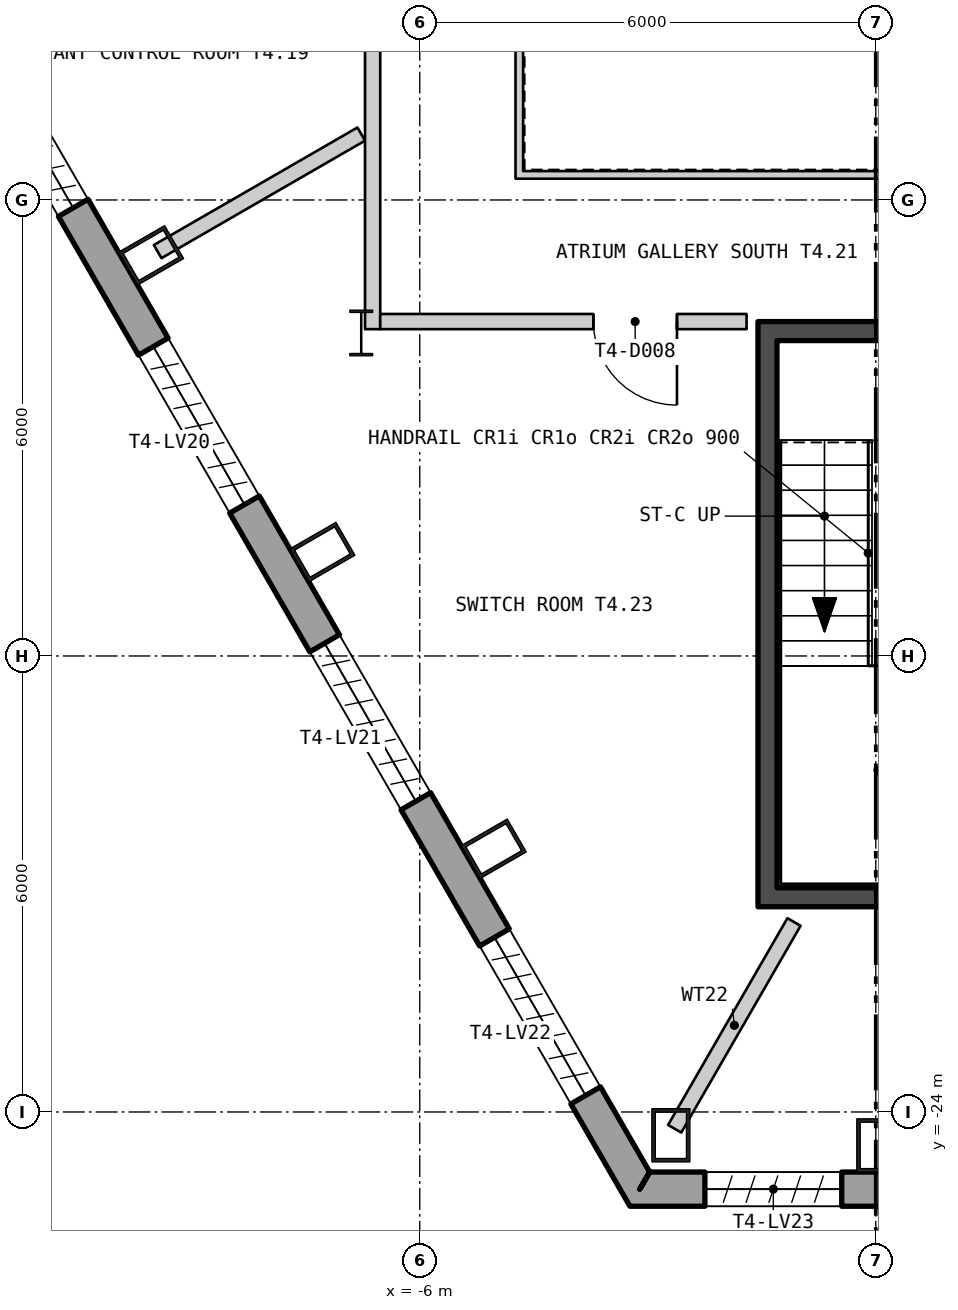
"""IFC4 building model, lengths in metres.
Left out: names, types, materials, properties, quantities, classifications, styles, units other than length and angle.
Written with IfcOpenShell. Run it as: python <this file> out.ifc"""

import sys

from ifc_helpers import new_model, si_unit, direction, frame, frame_2d, origin, origin_2d, place, context, subcontext, project, spatial, polyline, rectangle, hollow_rectangle, i_section, outline, extrude, element, fill, save


model = new_model("IFC4")
c1 = context("Model", 3, precision=1e-05, world=origin(), true_north=direction((0.0, 1.0)))
c2 = subcontext(c1, "Body", "Model", "MODEL_VIEW")
j1 = project(units=[si_unit("LENGTHUNIT", "METRE"), si_unit("PLANEANGLEUNIT", "RADIAN")], contexts=[c1])
p1 = place(None, origin())
s1 = spatial("IfcSite", under=j1, at=p1, CompositionType="ELEMENT")
p2 = place(p1, origin())
s2 = spatial("IfcBuilding", under=s1, at=p2, CompositionType="ELEMENT")
p3 = place(p2, frame((0.0, 0.0, 239.4)))
s3 = spatial("IfcBuildingStorey", under=s2, at=p3, CompositionType="ELEMENT", Elevation=239.4)
for number, where, z_axis, x_axis in (
    (1, (-9.535, -12.729, 0.0), (0.0, 0.0, 1.0), (0.5, -0.866, 0.0)),
    (2, (-7.281, -16.633, 0.0), (0.0, 0.0, 1.0), (0.5, -0.866, 0.0)),
    (3, (-5.027, -20.537, 0.0), (0.0, 0.0, 1.0), (0.5, -0.866, 0.0)),
    (4, (-2.696, -24.307, 0.0), (0.0, 0.0, 1.0), (1.0, 0.0, 0.0)),
    (5, (0.0, -24.44, 0.0), (0.0, 0.0, 1.0), (1.0, 0.0, 0.0)),
):
    element("IfcColumn", number, at=place(p3, frame(where, z_axis=z_axis, x_axis=x_axis)), inside=s3, PredefinedType="COLUMN", context=c2, shape_type="SweptSolid", body=[
        extrude(hollow_rectangle(XDim=0.5, YDim=0.7, WallThickness=0.045, at=origin_2d()), origin(), (0.0, 0.0, 1.0), 6.0),
    ])
p4 = place(p3, frame((-6.77, -13.75, 0.0), z_axis=(0.0, 0.0, 1.0), x_axis=(1.0, 0.0, 0.0)))
e6 = element("IfcColumn", 6, at=p4, inside=s3, PredefinedType="COLUMN", context=c2, shape_type="SweptSolid", body=[
    extrude(i_section(OverallWidth=0.3, OverallDepth=0.6, WebThickness=0.015, FlangeThickness=0.03, at=origin_2d()), origin(), (0.0, 0.0, 1.0), 6.0),
])
p5 = place(p3, frame((-25.975, 14.597, -0.18), z_axis=(0.0, 0.0, 1.0), x_axis=(0.499999764979, -0.866025539474, 0.0)))
e7 = element("IfcWall", 7, at=p5, inside=s3, PredefinedType="SOLIDWALL", context=c2, shape_type="SweptSolid", body=[
    extrude(outline(polyline([(-0.13, -0.225), (45.87, -0.225), (45.61, 0.225), (0.13, 0.225), (-0.13, -0.225)])), origin(), (0.0, 0.0, 1.0), 6.0),
])
p6 = place(p5, frame((1.424, 0.0, 1.38)))
e8 = element("IfcOpeningElement", 8, at=p6, cuts=e7, PredefinedType="OPENING", context=c2, shape_type="SweptSolid", body=[
    extrude(rectangle(XDim=2.4, YDim=3.6, at=frame_2d((1.2, 1.8))), frame((0.0, 0.235, 0.0), z_axis=(0.0, -1.0, 0.0), x_axis=(1.0, 0.0, 0.0)), (0.0, 0.0, 1.0), 0.47),
])
p7 = place(p5, frame((5.893, 0.0, 1.38)))
e9 = element("IfcOpeningElement", 9, at=p7, cuts=e7, PredefinedType="OPENING", context=c2, shape_type="SweptSolid", body=[
    extrude(rectangle(XDim=2.4, YDim=3.6, at=frame_2d((1.2, 1.8))), frame((0.0, 0.235, 0.0), z_axis=(0.0, -1.0, 0.0), x_axis=(1.0, 0.0, 0.0)), (0.0, 0.0, 1.0), 0.47),
])
p8 = place(p5, frame((10.401, 0.0, 1.38)))
e10 = element("IfcOpeningElement", 10, at=p8, cuts=e7, PredefinedType="OPENING", context=c2, shape_type="SweptSolid", body=[
    extrude(rectangle(XDim=2.4, YDim=3.6, at=frame_2d((1.2, 1.8))), frame((0.0, 0.235, 0.0), z_axis=(0.0, -1.0, 0.0), x_axis=(1.0, 0.0, 0.0)), (0.0, 0.0, 1.0), 0.47),
])
p9 = place(p5, frame((14.909, 0.0, 1.38)))
e11 = element("IfcOpeningElement", 11, at=p9, cuts=e7, PredefinedType="OPENING", context=c2, shape_type="SweptSolid", body=[
    extrude(rectangle(XDim=2.4, YDim=3.6, at=frame_2d((1.2, 1.8))), frame((0.0, 0.235, 0.0), z_axis=(0.0, -1.0, 0.0), x_axis=(1.0, 0.0, 0.0)), (0.0, 0.0, 1.0), 0.47),
])
p10 = place(p5, frame((19.416, 0.0, 1.38)))
e12 = element("IfcOpeningElement", 12, at=p10, cuts=e7, PredefinedType="OPENING", context=c2, shape_type="SweptSolid", body=[
    extrude(rectangle(XDim=2.4, YDim=3.6, at=frame_2d((1.2, 1.8))), frame((0.0, 0.235, 0.0), z_axis=(0.0, -1.0, 0.0), x_axis=(1.0, 0.0, 0.0)), (0.0, 0.0, 1.0), 0.47),
])
p11 = place(p5, frame((23.924, 0.0, 1.38)))
e13 = element("IfcOpeningElement", 13, at=p11, cuts=e7, PredefinedType="OPENING", context=c2, shape_type="SweptSolid", body=[
    extrude(rectangle(XDim=2.4, YDim=3.6, at=frame_2d((1.2, 1.8))), frame((0.0, 0.235, 0.0), z_axis=(0.0, -1.0, 0.0), x_axis=(1.0, 0.0, 0.0)), (0.0, 0.0, 1.0), 0.47),
])
p12 = place(p5, frame((28.431, 0.0, 1.38)))
e14 = element("IfcOpeningElement", 14, at=p12, cuts=e7, PredefinedType="OPENING", context=c2, shape_type="SweptSolid", body=[
    extrude(rectangle(XDim=2.4, YDim=3.6, at=frame_2d((1.2, 1.8))), frame((0.0, 0.235, 0.0), z_axis=(0.0, -1.0, 0.0), x_axis=(1.0, 0.0, 0.0)), (0.0, 0.0, 1.0), 0.47),
])
p13 = place(p5, frame((32.939, 0.0, 1.38)))
e15 = element("IfcOpeningElement", 15, at=p13, cuts=e7, PredefinedType="OPENING", context=c2, shape_type="SweptSolid", body=[
    extrude(rectangle(XDim=2.4, YDim=3.6, at=frame_2d((1.2, 1.8))), frame((0.0, 0.235, 0.0), z_axis=(0.0, -1.0, 0.0), x_axis=(1.0, 0.0, 0.0)), (0.0, 0.0, 1.0), 0.47),
])
p14 = place(p5, frame((37.447, 0.0, 1.38)))
e16 = element("IfcOpeningElement", 16, at=p14, cuts=e7, PredefinedType="OPENING", context=c2, shape_type="SweptSolid", body=[
    extrude(rectangle(XDim=2.4, YDim=3.6, at=frame_2d((1.2, 1.8))), frame((0.0, 0.235, 0.0), z_axis=(0.0, -1.0, 0.0), x_axis=(1.0, 0.0, 0.0)), (0.0, 0.0, 1.0), 0.47),
])
p15 = place(p5, frame((41.916, 0.0, 1.38)))
e17 = element("IfcOpeningElement", 17, at=p15, cuts=e7, PredefinedType="OPENING", context=c2, shape_type="SweptSolid", body=[
    extrude(rectangle(XDim=2.4, YDim=3.6, at=frame_2d((1.2, 1.8))), frame((0.0, 0.235, 0.0), z_axis=(0.0, -1.0, 0.0), x_axis=(1.0, 0.0, 0.0)), (0.0, 0.0, 1.0), 0.47),
])
p16 = place(p3, frame((-3.105, -25.015, -0.18), z_axis=(0.0, 0.0, 1.0), x_axis=(1.0, 0.0, 0.0)))
e18 = element("IfcWall", 18, at=p16, inside=s3, PredefinedType="SOLIDWALL", context=c2, shape_type="SweptSolid", body=[
    extrude(outline(polyline([(-0.13, -0.225), (6.34, -0.225), (6.08, 0.225), (0.13, 0.225), (-0.13, -0.225)])), origin(), (0.0, 0.0, 1.0), 6.0),
])
p17 = place(p16, frame((0.857, 0.0, 1.38)))
e19 = element("IfcOpeningElement", 19, at=p17, cuts=e18, PredefinedType="OPENING", context=c2, shape_type="SweptSolid", body=[
    extrude(rectangle(XDim=1.8, YDim=3.6, at=frame_2d((0.9, 1.8))), frame((0.0, 0.235, 0.0), z_axis=(0.0, -1.0, 0.0), x_axis=(1.0, 0.0, 0.0)), (0.0, 0.0, 1.0), 0.47),
])
p18 = place(p16, frame((3.553, 0.0, 1.38)))
e20 = element("IfcOpeningElement", 20, at=p18, cuts=e18, PredefinedType="OPENING", context=c2, shape_type="SweptSolid", body=[
    extrude(rectangle(XDim=1.8, YDim=3.6, at=frame_2d((0.9, 1.8))), frame((0.0, 0.235, 0.0), z_axis=(0.0, -1.0, 0.0), x_axis=(1.0, 0.0, 0.0)), (0.0, 0.0, 1.0), 0.47),
])
p19 = place(p3, frame((-4.74, -11.67, 0.0), z_axis=(0.0, 0.0, 1.0), x_axis=(1.0, 0.0, 0.0)))
e21 = element("IfcWall", 21, at=p19, inside=s3, PredefinedType="PARTITIONING", context=c2, shape_type="SweptSolid", body=[
    extrude(rectangle(XDim=9.48, YDim=0.1, at=frame_2d((4.74, 0.0))), origin(), (0.0, 0.0, 1.0), 5.8),
])
p20 = place(p3, frame((-4.69, -3.58, 0.0), z_axis=(0.0, 0.0, 1.0), x_axis=(0.0, -1.0, 0.0)))
e22 = element("IfcWall", 22, at=p20, inside=s3, PredefinedType="PARTITIONING", context=c2, shape_type="SweptSolid", body=[
    extrude(rectangle(XDim=8.04, YDim=0.1, at=frame_2d((4.02, 0.0))), origin(), (0.0, 0.0, 1.0), 5.8),
])
p21 = place(p3, frame((-1.425, -21.05, 0.0), z_axis=(0.0, 0.0, 1.0), x_axis=(0.0, 1.0, 0.0)))
e23 = element("IfcWall", 23, at=p21, inside=s3, PredefinedType="SHEAR", context=c2, shape_type="SweptSolid", body=[
    extrude(rectangle(XDim=7.2, YDim=0.25, at=frame_2d((3.6, 0.0))), origin(), (0.0, 0.0, 1.0), 5.8),
])
for number, where, z_axis, x_axis in (
    (24, (-1.55, -21.175, 0.0), (0.0, 0.0, 1.0), (1.0, 0.0, 0.0)),
    (25, (-1.55, -13.725, 0.0), (0.0, 0.0, 1.0), (1.0, 0.0, 0.0)),
):
    element("IfcWall", number, at=place(p3, frame(where, z_axis=z_axis, x_axis=x_axis)), inside=s3, PredefinedType="SHEAR", context=c2, shape_type="SweptSolid", body=[
        extrude(rectangle(XDim=3.1, YDim=0.25, at=frame_2d((1.55, 0.0))), origin(), (0.0, 0.0, 1.0), 5.8),
    ])
p22 = place(p3, frame((-9.448, -12.679, 0.0), z_axis=(0.0, 0.0, 1.0), x_axis=(0.866045570776, 0.499965068118, 0.0)))
e26 = element("IfcWall", 26, at=p22, inside=s3, PredefinedType="PARTITIONING", context=c2, shape_type="SweptSolid", body=[
    extrude(rectangle(XDim=3.092, YDim=0.2, at=frame_2d((1.546, 0.0))), origin(), (0.0, 0.0, 1.0), 5.8),
])
p23 = place(p3, frame((-6.62, -13.7, 0.0), z_axis=(0.0, 0.0, 1.0), x_axis=(0.0, 1.0, 0.0)))
e27 = element("IfcWall", 27, at=p23, inside=s3, PredefinedType="PARTITIONING", context=c2, shape_type="SweptSolid", body=[
    extrude(rectangle(XDim=10.5, YDim=0.2, at=frame_2d((5.25, 0.0))), origin(), (0.0, 0.0, 1.0), 5.21),
])
p24 = place(p23, frame((4.656, 0.0, 0.0)))
e28 = element("IfcOpeningElement", 28, at=p24, cuts=e27, PredefinedType="OPENING", context=c2, shape_type="SweptSolid", body=[
    extrude(rectangle(XDim=1.1, YDim=2.1, at=frame_2d((0.55, 1.05))), frame((0.0, 0.11, 0.0), z_axis=(0.0, -1.0, 0.0), x_axis=(1.0, 0.0, 0.0)), (0.0, 0.0, 1.0), 0.22),
])
p25 = place(p23, frame((8.059, 0.0, 0.0)))
e29 = element("IfcOpeningElement", 29, at=p25, cuts=e27, PredefinedType="OPENING", context=c2, shape_type="SweptSolid", body=[
    extrude(rectangle(XDim=1.1, YDim=2.1, at=frame_2d((0.55, 1.05))), frame((0.0, 0.11, 0.0), z_axis=(0.0, -1.0, 0.0), x_axis=(1.0, 0.0, 0.0)), (0.0, 0.0, 1.0), 0.22),
])
p26 = place(p3, frame((-6.52, -13.6, 0.0), z_axis=(0.0, 0.0, 1.0), x_axis=(1.0, 0.0, 0.0)))
e30 = element("IfcWall", 30, at=p26, inside=s3, PredefinedType="PARTITIONING", context=c2, shape_type="SweptSolid", body=[
    extrude(rectangle(XDim=4.82, YDim=0.2, at=frame_2d((2.41, 0.0))), origin(), (0.0, 0.0, 1.0), 5.01),
])
p27 = place(p26, frame((2.804, 0.0, 0.0)))
e31 = element("IfcOpeningElement", 31, at=p27, cuts=e30, PredefinedType="OPENING", context=c2, shape_type="SweptSolid", body=[
    extrude(rectangle(XDim=1.1, YDim=2.1, at=frame_2d((0.55, 1.05))), frame((0.0, 0.11, 0.0), z_axis=(0.0, -1.0, 0.0), x_axis=(1.0, 0.0, 0.0)), (0.0, 0.0, 1.0), 0.22),
])
p28 = place(p3, frame((-2.646, -24.221, 0.0), z_axis=(0.0, 0.0, 1.0), x_axis=(0.499768381861, 0.866159087288, 0.0)))
e32 = element("IfcWall", 32, at=p28, inside=s3, PredefinedType="PARTITIONING", context=c2, shape_type="SweptSolid", body=[
    extrude(rectangle(XDim=3.142, YDim=0.2, at=frame_2d((1.571, 0.0))), origin(), (0.0, 0.0, 1.0), 5.8),
])
p29 = place(p27, origin())
e33 = element("IfcDoor", 33, at=p29, inside=s3, OperationType="SINGLE_SWING_RIGHT", PredefinedType="DOOR", context=c2, shape_type="SweptSolid", body=[
    extrude(rectangle(XDim=1.1, YDim=2.1, at=frame_2d((0.55, 1.05))), frame((0.0, 0.025, 0.0), z_axis=(0.0, -1.0, 0.0), x_axis=(1.0, 0.0, 0.0)), (0.0, 0.0, 1.0), 0.05),
])
fill(e31, e33)
save(model, sys.argv[1])
